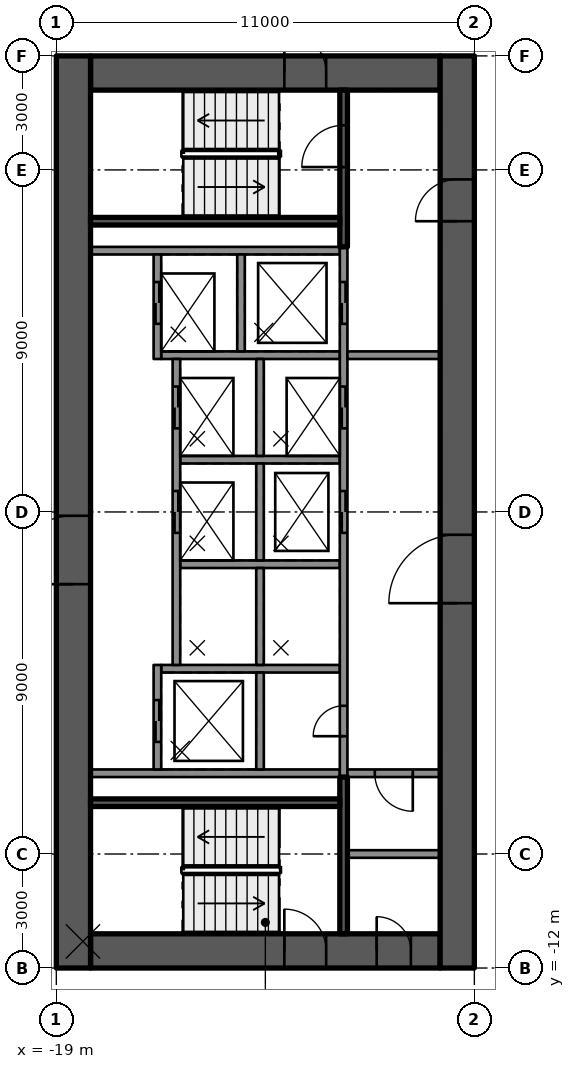
"""IFC4 building model, lengths in metres.
Left out: names, types, materials, properties, quantities, classifications, styles, units other than length and angle.
Written with IfcOpenShell. Run it as: python <this file> out.ifc"""

import sys

from ifc_helpers import new_model, si_unit, direction, frame, frame_2d, origin, place, context, subcontext, project, spatial, rectangle, extrude, element, fill, save


model = new_model("IFC4")
c1 = context("Model", 3, precision=1e-05, world=origin(), true_north=direction((0.0, 1.0)))
c2 = subcontext(c1, "Body", "Model", "MODEL_VIEW")
j1 = project(units=[si_unit("LENGTHUNIT", "METRE"), si_unit("PLANEANGLEUNIT", "RADIAN")], contexts=[c1])
p1 = place(None, origin())
s1 = spatial("IfcSite", under=j1, at=p1, CompositionType="ELEMENT")
p2 = place(p1, origin())
s2 = spatial("IfcBuilding", under=s1, at=p2, CompositionType="ELEMENT")
p3 = place(p2, frame((0.0, 0.0, 84.2)))
s3 = spatial("IfcBuildingStorey", under=s2, at=p3, CompositionType="ELEMENT", Elevation=84.2)
p4 = place(p3, frame((-18.1, 11.55, 0.0), z_axis=(0.0, 0.0, 1.0), x_axis=(1.0, 0.0, 0.0)))
e1 = element("IfcWall", 1, at=p4, inside=s3, PredefinedType="SHEAR", context=c2, shape_type="SweptSolid", body=[
    extrude(rectangle(XDim=9.2, YDim=0.9, at=frame_2d((4.6, 0.0))), origin(), (0.0, 0.0, 1.0), 3.5),
])
p5 = place(p4, frame((5.1, 0.0, 0.0)))
e2 = element("IfcOpeningElement", 2, at=p5, cuts=e1, PredefinedType="OPENING", context=c2, shape_type="SweptSolid", body=[
    extrude(rectangle(XDim=1.1, YDim=2.1, at=frame_2d((0.55, 1.05))), frame((0.0, 0.46, 0.0), z_axis=(0.0, -1.0, 0.0), x_axis=(1.0, 0.0, 0.0)), (0.0, 0.0, 1.0), 0.92),
])
p6 = place(p3, frame((-18.1, -11.55, 0.0), z_axis=(0.0, 0.0, 1.0), x_axis=(1.0, 0.0, 0.0)))
e3 = element("IfcWall", 3, at=p6, inside=s3, PredefinedType="SHEAR", context=c2, shape_type="SweptSolid", body=[
    extrude(rectangle(XDim=9.2, YDim=0.9, at=frame_2d((4.6, 0.0))), origin(), (0.0, 0.0, 1.0), 3.5),
])
p7 = place(p6, frame((5.1, 0.0, 0.0)))
e4 = element("IfcOpeningElement", 4, at=p7, cuts=e3, PredefinedType="OPENING", context=c2, shape_type="SweptSolid", body=[
    extrude(rectangle(XDim=1.1, YDim=2.1, at=frame_2d((0.55, 1.05))), frame((0.0, 0.46, 0.0), z_axis=(0.0, -1.0, 0.0), x_axis=(1.0, 0.0, 0.0)), (0.0, 0.0, 1.0), 0.92),
])
p8 = place(p6, frame((7.53, 0.0, 0.0)))
e5 = element("IfcOpeningElement", 5, at=p8, cuts=e3, PredefinedType="OPENING", context=c2, shape_type="SweptSolid", body=[
    extrude(rectangle(XDim=0.9, YDim=2.1, at=frame_2d((0.45, 1.05))), frame((0.0, 0.46, 0.0), z_axis=(0.0, -1.0, 0.0), x_axis=(1.0, 0.0, 0.0)), (0.0, 0.0, 1.0), 0.92),
])
p9 = place(p3, frame((-18.55, -12.0, 0.0), z_axis=(0.0, 0.0, 1.0), x_axis=(0.0, 1.0, 0.0)))
e6 = element("IfcWall", 6, at=p9, inside=s3, PredefinedType="SHEAR", context=c2, shape_type="SweptSolid", body=[
    extrude(rectangle(XDim=24.0, YDim=0.9, at=frame_2d((12.0, 0.0))), origin(), (0.0, 0.0, 1.0), 3.5),
])
p10 = place(p9, frame((10.1, 0.0, 0.0)))
e7 = element("IfcOpeningElement", 7, at=p10, cuts=e6, PredefinedType="OPENING", context=c2, shape_type="SweptSolid", body=[
    extrude(rectangle(XDim=1.8, YDim=2.1, at=frame_2d((0.9, 1.05))), frame((0.0, 0.46, 0.0), z_axis=(0.0, -1.0, 0.0), x_axis=(1.0, 0.0, 0.0)), (0.0, 0.0, 1.0), 0.92),
])
p11 = place(p3, frame((-8.45, -12.0, 0.0), z_axis=(0.0, 0.0, 1.0), x_axis=(0.0, 1.0, 0.0)))
e8 = element("IfcWall", 8, at=p11, inside=s3, PredefinedType="SHEAR", context=c2, shape_type="SweptSolid", body=[
    extrude(rectangle(XDim=24.0, YDim=0.9, at=frame_2d((12.0, 0.0))), origin(), (0.0, 0.0, 1.0), 3.5),
])
p12 = place(p11, frame((9.6, 0.0, 0.0)))
e9 = element("IfcOpeningElement", 9, at=p12, cuts=e8, PredefinedType="OPENING", context=c2, shape_type="SweptSolid", body=[
    extrude(rectangle(XDim=1.8, YDim=2.1, at=frame_2d((0.9, 1.05))), frame((0.0, 0.46, 0.0), z_axis=(0.0, -1.0, 0.0), x_axis=(1.0, 0.0, 0.0)), (0.0, 0.0, 1.0), 0.92),
])
p13 = place(p11, frame((19.65, 0.0, 0.0)))
e10 = element("IfcOpeningElement", 10, at=p13, cuts=e8, PredefinedType="OPENING", context=c2, shape_type="SweptSolid", body=[
    extrude(rectangle(XDim=1.1, YDim=2.1, at=frame_2d((0.55, 1.05))), frame((0.0, 0.46, 0.0), z_axis=(0.0, -1.0, 0.0), x_axis=(1.0, 0.0, 0.0)), (0.0, 0.0, 1.0), 0.92),
])
for number, where, z_axis, x_axis in (
    (11, (-11.54, 6.875, 0.0), (0.0, 0.0, 1.0), (-1.0, 0.0, 0.0)),
    (12, (-11.54, -6.875, 0.0), (0.0, 0.0, 1.0), (-1.0, 0.0, 0.0)),
):
    element("IfcWall", number, at=place(p3, frame(where, z_axis=z_axis, x_axis=x_axis)), inside=s3, PredefinedType="SOLIDWALL", context=c2, shape_type="SweptSolid", body=[
        extrude(rectangle(XDim=6.56, YDim=0.2, at=frame_2d((3.28, 0.0))), origin(), (0.0, 0.0, 1.0), 3.09),
    ])
p14 = place(p3, frame((-11.54, -4.125, 0.0), z_axis=(0.0, 0.0, 1.0), x_axis=(-1.0, 0.0, 0.0)))
e13 = element("IfcWall", 13, at=p14, inside=s3, PredefinedType="SOLIDWALL", context=c2, shape_type="SweptSolid", body=[
    extrude(rectangle(XDim=4.7, YDim=0.2, at=frame_2d((2.35, 0.0))), origin(), (0.0, 0.0, 1.0), 3.09),
])
for number, where, z_axis, x_axis in (
    (14, (-11.54, -1.375, 0.0), (0.0, 0.0, 1.0), (-1.0, 0.0, 0.0)),
    (15, (-11.54, 1.375, 0.0), (0.0, 0.0, 1.0), (-1.0, 0.0, 0.0)),
):
    element("IfcWall", number, at=place(p3, frame(where, z_axis=z_axis, x_axis=x_axis)), inside=s3, PredefinedType="SOLIDWALL", context=c2, shape_type="SweptSolid", body=[
        extrude(rectangle(XDim=4.2, YDim=0.2, at=frame_2d((2.1, 0.0))), origin(), (0.0, 0.0, 1.0), 3.09),
    ])
p15 = place(p3, frame((-11.54, 4.125, 0.0), z_axis=(0.0, 0.0, 1.0), x_axis=(-1.0, 0.0, 0.0)))
e16 = element("IfcWall", 16, at=p15, inside=s3, PredefinedType="SOLIDWALL", context=c2, shape_type="SweptSolid", body=[
    extrude(rectangle(XDim=4.7, YDim=0.2, at=frame_2d((2.35, 0.0))), origin(), (0.0, 0.0, 1.0), 3.09),
])
p16 = place(p3, frame((-11.44, -6.975, 0.0), z_axis=(0.0, 0.0, 1.0), x_axis=(0.0, 1.0, 0.0)))
e17 = element("IfcWall", 17, at=p16, inside=s3, PredefinedType="SOLIDWALL", context=c2, shape_type="SweptSolid", body=[
    extrude(rectangle(XDim=13.95, YDim=0.2, at=frame_2d((6.975, 0.0))), origin(), (0.0, 0.0, 1.0), 3.09),
])
p17 = place(p16, frame((6.425, 0.0, 0.0)))
e18 = element("IfcOpeningElement", 18, at=p17, cuts=e17, PredefinedType="OPENING", context=c2, shape_type="SweptSolid", body=[
    extrude(rectangle(XDim=1.1, YDim=2.1, at=frame_2d((0.55, 1.05))), frame((0.0, 0.11, 0.0), z_axis=(0.0, -1.0, 0.0), x_axis=(1.0, 0.0, 0.0)), (0.0, 0.0, 1.0), 0.22),
])
p18 = place(p16, frame((9.175, 0.0, 0.0)))
e19 = element("IfcOpeningElement", 19, at=p18, cuts=e17, PredefinedType="OPENING", context=c2, shape_type="SweptSolid", body=[
    extrude(rectangle(XDim=1.1, YDim=2.1, at=frame_2d((0.55, 1.05))), frame((0.0, 0.11, 0.0), z_axis=(0.0, -1.0, 0.0), x_axis=(1.0, 0.0, 0.0)), (0.0, 0.0, 1.0), 0.22),
])
p19 = place(p16, frame((11.925, 0.0, 0.0)))
e20 = element("IfcOpeningElement", 20, at=p19, cuts=e17, PredefinedType="OPENING", context=c2, shape_type="SweptSolid", body=[
    extrude(rectangle(XDim=1.1, YDim=2.1, at=frame_2d((0.55, 1.05))), frame((0.0, 0.11, 0.0), z_axis=(0.0, -1.0, 0.0), x_axis=(1.0, 0.0, 0.0)), (0.0, 0.0, 1.0), 0.22),
])
p20 = place(p16, frame((1.075, 0.0, 0.0)))
e21 = element("IfcOpeningElement", 21, at=p20, cuts=e17, PredefinedType="OPENING", context=c2, shape_type="SweptSolid", body=[
    extrude(rectangle(XDim=0.8, YDim=2.1, at=frame_2d((0.4, 1.05))), frame((0.0, 0.11, 0.0), z_axis=(0.0, -1.0, 0.0), x_axis=(1.0, 0.0, 0.0)), (0.0, 0.0, 1.0), 0.22),
])
for number, where, z_axis, x_axis in (
    (22, (-13.64, -6.775, 0.0), (0.0, 0.0, 1.0), (0.0, 1.0, 0.0)),
    (23, (-13.64, -4.025, 0.0), (0.0, 0.0, 1.0), (0.0, 1.0, 0.0)),
    (24, (-13.64, -1.275, 0.0), (0.0, 0.0, 1.0), (0.0, 1.0, 0.0)),
    (25, (-13.64, 1.475, 0.0), (0.0, 0.0, 1.0), (0.0, 1.0, 0.0)),
    (26, (-14.14, 4.225, 0.0), (0.0, 0.0, 1.0), (0.0, 1.0, 0.0)),
):
    element("IfcWall", number, at=place(p3, frame(where, z_axis=z_axis, x_axis=x_axis)), inside=s3, PredefinedType="SOLIDWALL", context=c2, shape_type="SweptSolid", body=[
        extrude(rectangle(XDim=2.55, YDim=0.2, at=frame_2d((1.275, 0.0))), origin(), (0.0, 0.0, 1.0), 3.09),
    ])
p21 = place(p3, frame((-16.34, -6.775, 0.0), z_axis=(0.0, 0.0, 1.0), x_axis=(0.0, 1.0, 0.0)))
e27 = element("IfcWall", 27, at=p21, inside=s3, PredefinedType="SOLIDWALL", context=c2, shape_type="SweptSolid", body=[
    extrude(rectangle(XDim=2.75, YDim=0.2, at=frame_2d((1.375, 0.0))), origin(), (0.0, 0.0, 1.0), 3.09),
])
p22 = place(p21, frame((0.725, 0.0, 0.0)))
e28 = element("IfcOpeningElement", 28, at=p22, cuts=e27, PredefinedType="OPENING", context=c2, shape_type="SweptSolid", body=[
    extrude(rectangle(XDim=1.1, YDim=2.1, at=frame_2d((0.55, 1.05))), frame((0.0, 0.11, 0.0), z_axis=(0.0, -1.0, 0.0), x_axis=(1.0, 0.0, 0.0)), (0.0, 0.0, 1.0), 0.22),
])
p23 = place(p3, frame((-15.84, -4.025, 0.0), z_axis=(0.0, 0.0, 1.0), x_axis=(0.0, 1.0, 0.0)))
e29 = element("IfcWall", 29, at=p23, inside=s3, PredefinedType="SOLIDWALL", context=c2, shape_type="SweptSolid", body=[
    extrude(rectangle(XDim=8.05, YDim=0.2, at=frame_2d((4.025, 0.0))), origin(), (0.0, 0.0, 1.0), 3.09),
])
p24 = place(p23, frame((3.475, 0.0, 0.0)))
e30 = element("IfcOpeningElement", 30, at=p24, cuts=e29, PredefinedType="OPENING", context=c2, shape_type="SweptSolid", body=[
    extrude(rectangle(XDim=1.1, YDim=2.1, at=frame_2d((0.55, 1.05))), frame((0.0, 0.11, 0.0), z_axis=(0.0, -1.0, 0.0), x_axis=(1.0, 0.0, 0.0)), (0.0, 0.0, 1.0), 0.22),
])
p25 = place(p23, frame((6.225, 0.0, 0.0)))
e31 = element("IfcOpeningElement", 31, at=p25, cuts=e29, PredefinedType="OPENING", context=c2, shape_type="SweptSolid", body=[
    extrude(rectangle(XDim=1.1, YDim=2.1, at=frame_2d((0.55, 1.05))), frame((0.0, 0.11, 0.0), z_axis=(0.0, -1.0, 0.0), x_axis=(1.0, 0.0, 0.0)), (0.0, 0.0, 1.0), 0.22),
])
p26 = place(p3, frame((-16.34, 4.025, 0.0), z_axis=(0.0, 0.0, 1.0), x_axis=(0.0, 1.0, 0.0)))
e32 = element("IfcWall", 32, at=p26, inside=s3, PredefinedType="SOLIDWALL", context=c2, shape_type="SweptSolid", body=[
    extrude(rectangle(XDim=2.75, YDim=0.2, at=frame_2d((1.375, 0.0))), origin(), (0.0, 0.0, 1.0), 3.09),
])
p27 = place(p26, frame((0.925, 0.0, 0.0)))
e33 = element("IfcOpeningElement", 33, at=p27, cuts=e32, PredefinedType="OPENING", context=c2, shape_type="SweptSolid", body=[
    extrude(rectangle(XDim=1.1, YDim=2.1, at=frame_2d((0.55, 1.05))), frame((0.0, 0.11, 0.0), z_axis=(0.0, -1.0, 0.0), x_axis=(1.0, 0.0, 0.0)), (0.0, 0.0, 1.0), 0.22),
])
p28 = place(p3, frame((-11.44, 6.975, 0.0), z_axis=(0.0, 0.0, 1.0), x_axis=(0.0, 1.0, 0.0)))
e34 = element("IfcWall", 34, at=p28, inside=s3, PredefinedType="SOLIDWALL", context=c2, shape_type="SweptSolid", body=[
    extrude(rectangle(XDim=4.125, YDim=0.2, at=frame_2d((2.062, 0.0))), origin(), (0.0, 0.0, 1.0), 3.09),
])
p29 = place(p28, frame((2.1, 0.0, 0.0)))
e35 = element("IfcOpeningElement", 35, at=p29, cuts=e34, PredefinedType="OPENING", context=c2, shape_type="SweptSolid", body=[
    extrude(rectangle(XDim=1.1, YDim=2.1, at=frame_2d((0.55, 1.05))), frame((0.0, 0.11, 0.0), z_axis=(0.0, -1.0, 0.0), x_axis=(1.0, 0.0, 0.0)), (0.0, 0.0, 1.0), 0.22),
])
p30 = place(p3, frame((-11.54, 7.65, 0.0), z_axis=(0.0, 0.0, 1.0), x_axis=(-1.0, 0.0, 0.0)))
e36 = element("IfcWall", 36, at=p30, inside=s3, PredefinedType="SOLIDWALL", context=c2, shape_type="SweptSolid", body=[
    extrude(rectangle(XDim=6.56, YDim=0.2, at=frame_2d((3.28, 0.0))), origin(), (0.0, 0.0, 1.0), 3.09),
])
p31 = place(p3, frame((-11.44, -11.1, 0.0), z_axis=(0.0, 0.0, 1.0), x_axis=(0.0, 1.0, 0.0)))
e37 = element("IfcWall", 37, at=p31, inside=s3, PredefinedType="SOLIDWALL", context=c2, shape_type="SweptSolid", body=[
    extrude(rectangle(XDim=4.125, YDim=0.2, at=frame_2d((2.062, 0.0))), origin(), (0.0, 0.0, 1.0), 3.09),
])
p32 = place(p3, frame((-11.54, -7.65, 0.0), z_axis=(0.0, 0.0, 1.0), x_axis=(-1.0, 0.0, 0.0)))
e38 = element("IfcWall", 38, at=p32, inside=s3, PredefinedType="SOLIDWALL", context=c2, shape_type="SweptSolid", body=[
    extrude(rectangle(XDim=6.56, YDim=0.2, at=frame_2d((3.28, 0.0))), origin(), (0.0, 0.0, 1.0), 3.09),
])
p33 = place(p3, frame((-8.9, 4.125, 0.0), z_axis=(0.0, 0.0, 1.0), x_axis=(-1.0, 0.0, 0.0)))
e39 = element("IfcWall", 39, at=p33, inside=s3, PredefinedType="PARTITIONING", context=c2, shape_type="SweptSolid", body=[
    extrude(rectangle(XDim=2.44, YDim=0.2, at=frame_2d((1.22, 0.0))), origin(), (0.0, 0.0, 1.0), 3.09),
])
p34 = place(p3, frame((-8.9, -6.875, 0.0), z_axis=(0.0, 0.0, 1.0), x_axis=(-1.0, 0.0, 0.0)))
e40 = element("IfcWall", 40, at=p34, inside=s3, PredefinedType="PARTITIONING", context=c2, shape_type="SweptSolid", body=[
    extrude(rectangle(XDim=2.44, YDim=0.2, at=frame_2d((1.22, 0.0))), origin(), (0.0, 0.0, 1.0), 3.09),
])
p35 = place(p34, frame((0.72, 0.0, 0.0)))
e41 = element("IfcOpeningElement", 41, at=p35, cuts=e40, PredefinedType="OPENING", context=c2, shape_type="SweptSolid", body=[
    extrude(rectangle(XDim=1.0, YDim=2.1, at=frame_2d((0.5, 1.05))), frame((0.0, 0.11, 0.0), z_axis=(0.0, -1.0, 0.0), x_axis=(1.0, 0.0, 0.0)), (0.0, 0.0, 1.0), 0.22),
])
p36 = place(p3, frame((-8.9, -9.0, 0.0), z_axis=(0.0, 0.0, 1.0), x_axis=(-1.0, 0.0, 0.0)))
e42 = element("IfcWall", 42, at=p36, inside=s3, PredefinedType="PARTITIONING", context=c2, shape_type="SweptSolid", body=[
    extrude(rectangle(XDim=2.44, YDim=0.2, at=frame_2d((1.22, 0.0))), origin(), (0.0, 0.0, 1.0), 3.09),
])
p37 = place(p22, origin())
e43 = element("IfcDoor", 43, at=p37, inside=s3, OperationType="DOUBLE_DOOR_SLIDING", PredefinedType="DOOR", context=c2, shape_type="SweptSolid", body=[
    extrude(rectangle(XDim=1.1, YDim=2.1, at=frame_2d((0.55, 1.05))), frame((0.0, 0.025, 0.0), z_axis=(0.0, -1.0, 0.0), x_axis=(1.0, 0.0, 0.0)), (0.0, 0.0, 1.0), 0.05),
])
fill(e28, e43)
p38 = place(p17, origin())
e44 = element("IfcDoor", 44, at=p38, inside=s3, OperationType="DOUBLE_DOOR_SLIDING", PredefinedType="DOOR", context=c2, shape_type="SweptSolid", body=[
    extrude(rectangle(XDim=1.1, YDim=2.1, at=frame_2d((0.55, 1.05))), frame((0.0, 0.025, 0.0), z_axis=(0.0, -1.0, 0.0), x_axis=(1.0, 0.0, 0.0)), (0.0, 0.0, 1.0), 0.05),
])
fill(e18, e44)
p39 = place(p24, origin())
e45 = element("IfcDoor", 45, at=p39, inside=s3, OperationType="DOUBLE_DOOR_SLIDING", PredefinedType="DOOR", context=c2, shape_type="SweptSolid", body=[
    extrude(rectangle(XDim=1.1, YDim=2.1, at=frame_2d((0.55, 1.05))), frame((0.0, 0.025, 0.0), z_axis=(0.0, -1.0, 0.0), x_axis=(1.0, 0.0, 0.0)), (0.0, 0.0, 1.0), 0.05),
])
fill(e30, e45)
p40 = place(p18, origin())
e46 = element("IfcDoor", 46, at=p40, inside=s3, OperationType="DOUBLE_DOOR_SLIDING", PredefinedType="DOOR", context=c2, shape_type="SweptSolid", body=[
    extrude(rectangle(XDim=1.1, YDim=2.1, at=frame_2d((0.55, 1.05))), frame((0.0, 0.025, 0.0), z_axis=(0.0, -1.0, 0.0), x_axis=(1.0, 0.0, 0.0)), (0.0, 0.0, 1.0), 0.05),
])
fill(e19, e46)
p41 = place(p25, origin())
e47 = element("IfcDoor", 47, at=p41, inside=s3, OperationType="DOUBLE_DOOR_SLIDING", PredefinedType="DOOR", context=c2, shape_type="SweptSolid", body=[
    extrude(rectangle(XDim=1.1, YDim=2.1, at=frame_2d((0.55, 1.05))), frame((0.0, 0.025, 0.0), z_axis=(0.0, -1.0, 0.0), x_axis=(1.0, 0.0, 0.0)), (0.0, 0.0, 1.0), 0.05),
])
fill(e31, e47)
p42 = place(p19, origin())
e48 = element("IfcDoor", 48, at=p42, inside=s3, OperationType="DOUBLE_DOOR_SLIDING", PredefinedType="DOOR", context=c2, shape_type="SweptSolid", body=[
    extrude(rectangle(XDim=1.1, YDim=2.1, at=frame_2d((0.55, 1.05))), frame((0.0, 0.025, 0.0), z_axis=(0.0, -1.0, 0.0), x_axis=(1.0, 0.0, 0.0)), (0.0, 0.0, 1.0), 0.05),
])
fill(e20, e48)
p43 = place(p27, origin())
e49 = element("IfcDoor", 49, at=p43, inside=s3, OperationType="DOUBLE_DOOR_SLIDING", PredefinedType="DOOR", context=c2, shape_type="SweptSolid", body=[
    extrude(rectangle(XDim=1.1, YDim=2.1, at=frame_2d((0.55, 1.05))), frame((0.0, 0.025, 0.0), z_axis=(0.0, -1.0, 0.0), x_axis=(1.0, 0.0, 0.0)), (0.0, 0.0, 1.0), 0.05),
])
fill(e33, e49)
p44 = place(p20, origin())
e50 = element("IfcDoor", 50, at=p44, inside=s3, OperationType="SINGLE_SWING_LEFT", PredefinedType="DOOR", context=c2, shape_type="SweptSolid", body=[
    extrude(rectangle(XDim=0.8, YDim=2.1, at=frame_2d((0.4, 1.05))), frame((0.0, 0.025, 0.0), z_axis=(0.0, -1.0, 0.0), x_axis=(1.0, 0.0, 0.0)), (0.0, 0.0, 1.0), 0.05),
])
fill(e21, e50)
p45 = place(p12, origin())
e51 = element("IfcDoor", 51, at=p45, inside=s3, OperationType="SINGLE_SWING_LEFT", PredefinedType="DOOR", context=c2, shape_type="SweptSolid", body=[
    extrude(rectangle(XDim=1.8, YDim=2.1, at=frame_2d((0.9, 1.05))), frame((0.0, 0.025, 0.0), z_axis=(0.0, -1.0, 0.0), x_axis=(1.0, 0.0, 0.0)), (0.0, 0.0, 1.0), 0.05),
])
fill(e9, e51)
p46 = place(p10, origin())
e52 = element("IfcDoor", 52, at=p46, inside=s3, OperationType="SINGLE_SWING_LEFT", PredefinedType="DOOR", context=c2, shape_type="SweptSolid", body=[
    extrude(rectangle(XDim=1.8, YDim=2.1, at=frame_2d((0.9, 1.05))), frame((0.0, 0.025, 0.0), z_axis=(0.0, -1.0, 0.0), x_axis=(1.0, 0.0, 0.0)), (0.0, 0.0, 1.0), 0.05),
])
fill(e7, e52)
p47 = place(p13, origin())
e53 = element("IfcDoor", 53, at=p47, inside=s3, OperationType="SINGLE_SWING_RIGHT", PredefinedType="DOOR", context=c2, shape_type="SweptSolid", body=[
    extrude(rectangle(XDim=1.1, YDim=2.1, at=frame_2d((0.55, 1.05))), frame((0.0, 0.025, 0.0), z_axis=(0.0, -1.0, 0.0), x_axis=(1.0, 0.0, 0.0)), (0.0, 0.0, 1.0), 0.05),
])
fill(e10, e53)
p48 = place(p5, origin())
e54 = element("IfcDoor", 54, at=p48, inside=s3, OperationType="SINGLE_SWING_RIGHT", PredefinedType="DOOR", context=c2, shape_type="SweptSolid", body=[
    extrude(rectangle(XDim=1.1, YDim=2.1, at=frame_2d((0.55, 1.05))), frame((0.0, 0.025, 0.0), z_axis=(0.0, -1.0, 0.0), x_axis=(1.0, 0.0, 0.0)), (0.0, 0.0, 1.0), 0.05),
])
fill(e2, e54)
p49 = place(p7, origin())
e55 = element("IfcDoor", 55, at=p49, inside=s3, OperationType="SINGLE_SWING_RIGHT", PredefinedType="DOOR", context=c2, shape_type="SweptSolid", body=[
    extrude(rectangle(XDim=1.1, YDim=2.1, at=frame_2d((0.55, 1.05))), frame((0.0, 0.025, 0.0), z_axis=(0.0, -1.0, 0.0), x_axis=(1.0, 0.0, 0.0)), (0.0, 0.0, 1.0), 0.05),
])
fill(e4, e55)
p50 = place(p29, origin())
e56 = element("IfcDoor", 56, at=p50, inside=s3, OperationType="SINGLE_SWING_RIGHT", PredefinedType="DOOR", context=c2, shape_type="SweptSolid", body=[
    extrude(rectangle(XDim=1.1, YDim=2.1, at=frame_2d((0.55, 1.05))), frame((0.0, 0.025, 0.0), z_axis=(0.0, -1.0, 0.0), x_axis=(1.0, 0.0, 0.0)), (0.0, 0.0, 1.0), 0.05),
])
fill(e35, e56)
p51 = place(p8, origin())
e57 = element("IfcDoor", 57, at=p51, inside=s3, OperationType="SINGLE_SWING_RIGHT", PredefinedType="DOOR", context=c2, shape_type="SweptSolid", body=[
    extrude(rectangle(XDim=0.9, YDim=2.1, at=frame_2d((0.45, 1.05))), frame((0.0, 0.025, 0.0), z_axis=(0.0, -1.0, 0.0), x_axis=(1.0, 0.0, 0.0)), (0.0, 0.0, 1.0), 0.05),
])
fill(e5, e57)
p52 = place(p35, origin())
e58 = element("IfcDoor", 58, at=p52, inside=s3, OperationType="SINGLE_SWING_RIGHT", PredefinedType="DOOR", context=c2, shape_type="SweptSolid", body=[
    extrude(rectangle(XDim=1.0, YDim=2.1, at=frame_2d((0.5, 1.05))), frame((0.0, 0.025, 0.0), z_axis=(0.0, -1.0, 0.0), x_axis=(1.0, 0.0, 0.0)), (0.0, 0.0, 1.0), 0.05),
])
fill(e41, e58)
save(model, sys.argv[1])
